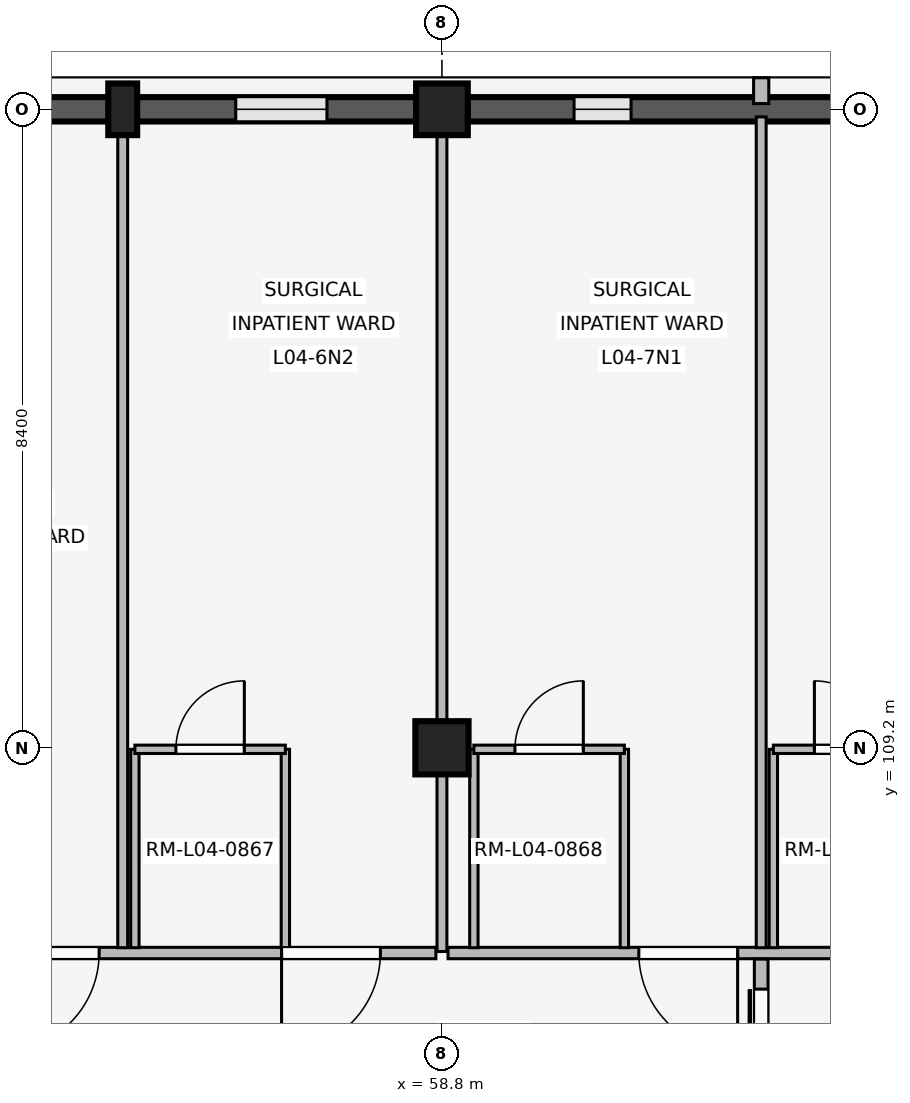
"""IFC4 building model, lengths in metres.
Left out: names, types, materials, properties, quantities, classifications, styles, units other than length and angle.
Written with IfcOpenShell. Run it as: python <this file> out.ifc"""

import sys

from ifc_helpers import new_model, si_unit, direction, frame, frame_2d, origin, origin_2d, place, context, subcontext, project, spatial, rectangle, extrude, element, fill, save


model = new_model("IFC4")
c1 = context("Model", 3, precision=1e-05, world=origin(), true_north=direction((0.0, 1.0)))
c2 = subcontext(c1, "Body", "Model", "MODEL_VIEW")
j1 = project(units=[si_unit("LENGTHUNIT", "METRE"), si_unit("PLANEANGLEUNIT", "RADIAN")], contexts=[c1])
p1 = place(None, origin())
s1 = spatial("IfcSite", under=j1, at=p1, CompositionType="ELEMENT")
p2 = place(p1, origin())
s2 = spatial("IfcBuilding", under=s1, at=p2, CompositionType="ELEMENT")
p3 = place(p2, frame((0.0, 0.0, 16.2)))
s3 = spatial("IfcBuildingStorey", under=s2, at=p3, CompositionType="ELEMENT", Elevation=16.2)
p4 = place(p3, frame((58.8, 109.2, 0.0), z_axis=(0.0, 0.0, 1.0), x_axis=(1.0, 0.0, 0.0)))
e1 = element("IfcColumn", 1, at=p4, inside=s3, PredefinedType="COLUMN", context=c2, shape_type="SweptSolid", body=[
    extrude(rectangle(XDim=0.7, YDim=0.7, at=origin_2d()), origin(), (0.0, 0.0, 1.0), 4.2),
])
p5 = place(p3, frame((58.8, 117.6, 0.0), z_axis=(0.0, 0.0, 1.0), x_axis=(1.0, 0.0, 0.0)))
e2 = element("IfcColumn", 2, at=p5, inside=s3, PredefinedType="COLUMN", context=c2, shape_type="SweptSolid", body=[
    extrude(rectangle(XDim=0.68, YDim=0.68, at=origin_2d()), origin(), (0.0, 0.0, 1.0), 4.2),
])
p6 = place(p3, frame((54.6, 117.6, 0.0), z_axis=(0.0, 0.0, 1.0), x_axis=(1.0, 0.0, 0.0)))
e3 = element("IfcColumn", 3, at=p6, inside=s3, PredefinedType="PILASTER", context=c2, shape_type="SweptSolid", body=[
    extrude(rectangle(XDim=0.38, YDim=0.68, at=origin_2d()), origin(), (0.0, 0.0, 1.0), 4.2),
])
p7 = place(p3, frame((50.735, 117.6, 0.0), z_axis=(0.0, 0.0, 1.0), x_axis=(1.0, 0.0, 0.0)))
e4 = element("IfcWall", 4, at=p7, inside=s3, PredefinedType="SOLIDWALL", context=c2, shape_type="SweptSolid", body=[
    extrude(rectangle(XDim=7.73, YDim=0.32, at=frame_2d((3.865, 0.0))), origin(), (0.0, 0.0, 1.0), 3.32),
])
p8 = place(p7, frame((1.178, 0.0, 0.85)))
e5 = element("IfcOpeningElement", 5, at=p8, cuts=e4, PredefinedType="OPENING", context=c2, shape_type="SweptSolid", body=[
    extrude(rectangle(XDim=1.2, YDim=1.55, at=frame_2d((0.6, 0.775))), frame((0.0, 0.17, 0.0), z_axis=(0.0, -1.0, 0.0), x_axis=(1.0, 0.0, 0.0)), (0.0, 0.0, 1.0), 0.34),
])
p9 = place(p7, frame((5.352, 0.0, 0.85)))
e6 = element("IfcOpeningElement", 6, at=p9, cuts=e4, PredefinedType="OPENING", context=c2, shape_type="SweptSolid", body=[
    extrude(rectangle(XDim=1.2, YDim=1.55, at=frame_2d((0.6, 0.775))), frame((0.0, 0.17, 0.0), z_axis=(0.0, -1.0, 0.0), x_axis=(1.0, 0.0, 0.0)), (0.0, 0.0, 1.0), 0.34),
])
p10 = place(p3, frame((59.135, 117.6, 0.0), z_axis=(0.0, 0.0, 1.0), x_axis=(1.0, 0.0, 0.0)))
e7 = element("IfcWall", 7, at=p10, inside=s3, PredefinedType="SOLIDWALL", context=c2, shape_type="SweptSolid", body=[
    extrude(rectangle(XDim=7.73, YDim=0.32, at=frame_2d((3.865, 0.0))), origin(), (0.0, 0.0, 1.0), 3.32),
])
p11 = place(p10, frame((1.403, 0.0, 0.85)))
e8 = element("IfcOpeningElement", 8, at=p11, cuts=e7, PredefinedType="OPENING", context=c2, shape_type="SweptSolid", body=[
    extrude(rectangle(XDim=0.75, YDim=1.85, at=frame_2d((0.375, 0.925))), frame((0.0, 0.17, 0.0), z_axis=(0.0, -1.0, 0.0), x_axis=(1.0, 0.0, 0.0)), (0.0, 0.0, 1.0), 0.34),
])
p12 = place(p10, frame((5.577, 0.0, 0.85)))
e9 = element("IfcOpeningElement", 9, at=p12, cuts=e7, PredefinedType="OPENING", context=c2, shape_type="SweptSolid", body=[
    extrude(rectangle(XDim=0.75, YDim=1.85, at=frame_2d((0.375, 0.925))), frame((0.0, 0.17, 0.0), z_axis=(0.0, -1.0, 0.0), x_axis=(1.0, 0.0, 0.0)), (0.0, 0.0, 1.0), 0.34),
])
p13 = place(p3, frame((63.0, 117.675, 0.0), z_axis=(0.0, 0.0, 1.0), x_axis=(0.0, 1.0, 0.0)))
e10 = element("IfcWall", 10, at=p13, inside=s3, PredefinedType="ELEMENTEDWALL", context=c2, shape_type="SweptSolid", body=[
    extrude(rectangle(XDim=0.34, YDim=0.2, at=frame_2d((0.17, 0.0))), origin(), (0.0, 0.0, 1.0), 3.3),
])
p14 = place(p3, frame((58.72, 106.5, 0.0), z_axis=(0.0, 0.0, 1.0), x_axis=(-1.0, 0.0, 0.0)))
e11 = element("IfcWall", 11, at=p14, inside=s3, PredefinedType="PARTITIONING", context=c2, shape_type="SweptSolid", body=[
    extrude(rectangle(XDim=7.96, YDim=0.15, at=frame_2d((3.98, 0.0))), origin(), (0.0, 0.0, 1.0), 3.3),
])
p15 = place(p14, frame((0.73, 0.0, 0.0)))
e12 = element("IfcOpeningElement", 12, at=p15, cuts=e11, PredefinedType="OPENING", context=c2, shape_type="SweptSolid", body=[
    extrude(rectangle(XDim=1.3, YDim=2.25, at=frame_2d((0.65, 1.125))), frame((0.0, 0.085, 0.0), z_axis=(0.0, -1.0, 0.0), x_axis=(1.0, 0.0, 0.0)), (0.0, 0.0, 1.0), 0.17),
])
p16 = place(p14, frame((4.43, 0.0, 0.0)))
e13 = element("IfcOpeningElement", 13, at=p16, cuts=e11, PredefinedType="OPENING", context=c2, shape_type="SweptSolid", body=[
    extrude(rectangle(XDim=1.3, YDim=2.25, at=frame_2d((0.65, 1.125))), frame((0.0, 0.085, 0.0), z_axis=(0.0, -1.0, 0.0), x_axis=(1.0, 0.0, 0.0)), (0.0, 0.0, 1.0), 0.17),
])
p17 = place(p3, frame((54.6, 106.57, 0.0), z_axis=(0.0, 0.0, 1.0), x_axis=(0.0, 1.0, 0.0)))
e14 = element("IfcWall", 14, at=p17, inside=s3, PredefinedType="PARTITIONING", context=c2, shape_type="SweptSolid", body=[
    extrude(rectangle(XDim=10.93, YDim=0.13, at=frame_2d((5.465, 0.0))), origin(), (0.0, 0.0, 1.0), 3.3),
])
for number, where, z_axis, x_axis in (
    (15, (54.76, 106.57, 0.0), (0.0, 0.0, 1.0), (0.0, 1.0, 0.0)),
    (16, (56.74, 106.57, 0.0), (0.0, 0.0, 1.0), (0.0, 1.0, 0.0)),
):
    element("IfcWall", number, at=place(p3, frame(where, z_axis=z_axis, x_axis=x_axis)), inside=s3, PredefinedType="PARTITIONING", context=c2, shape_type="SweptSolid", body=[
        extrude(rectangle(XDim=2.61, YDim=0.11, at=frame_2d((1.305, 0.0))), origin(), (0.0, 0.0, 1.0), 3.3),
    ])
p18 = place(p3, frame((54.76, 109.18, 0.0), z_axis=(0.0, 0.0, 1.0), x_axis=(1.0, 0.0, 0.0)))
e17 = element("IfcWall", 17, at=p18, inside=s3, PredefinedType="PARTITIONING", context=c2, shape_type="SweptSolid", body=[
    extrude(rectangle(XDim=1.98, YDim=0.11, at=frame_2d((0.99, 0.0))), origin(), (0.0, 0.0, 1.0), 3.3),
])
p19 = place(p18, frame((0.54, 0.0, 0.0)))
e18 = element("IfcOpeningElement", 18, at=p19, cuts=e17, PredefinedType="OPENING", context=c2, shape_type="SweptSolid", body=[
    extrude(rectangle(XDim=0.9, YDim=2.1, at=frame_2d((0.45, 1.05))), frame((0.0, 0.065, 0.0), z_axis=(0.0, -1.0, 0.0), x_axis=(1.0, 0.0, 0.0)), (0.0, 0.0, 1.0), 0.13),
])
p20 = place(p3, frame((58.8, 106.52, 0.0), z_axis=(0.0, 0.0, 1.0), x_axis=(0.0, 1.0, 0.0)))
e19 = element("IfcWall", 19, at=p20, inside=s3, PredefinedType="PARTITIONING", context=c2, shape_type="SweptSolid", body=[
    extrude(rectangle(XDim=10.94, YDim=0.13, at=frame_2d((5.47, 0.0))), origin(), (0.0, 0.0, 1.0), 3.3),
])
p21 = place(p3, frame((67.12, 106.5, 0.0), z_axis=(0.0, 0.0, 1.0), x_axis=(-1.0, 0.0, 0.0)))
e20 = element("IfcWall", 20, at=p21, inside=s3, PredefinedType="PARTITIONING", context=c2, shape_type="SweptSolid", body=[
    extrude(rectangle(XDim=8.24, YDim=0.15, at=frame_2d((4.12, 0.0))), origin(), (0.0, 0.0, 1.0), 3.3),
])
p22 = place(p21, frame((0.73, 0.0, 0.0)))
e21 = element("IfcOpeningElement", 21, at=p22, cuts=e20, PredefinedType="OPENING", context=c2, shape_type="SweptSolid", body=[
    extrude(rectangle(XDim=1.3, YDim=2.25, at=frame_2d((0.65, 1.125))), frame((0.0, 0.085, 0.0), z_axis=(0.0, -1.0, 0.0), x_axis=(1.0, 0.0, 0.0)), (0.0, 0.0, 1.0), 0.17),
])
p23 = place(p21, frame((4.43, 0.0, 0.0)))
e22 = element("IfcOpeningElement", 22, at=p23, cuts=e20, PredefinedType="OPENING", context=c2, shape_type="SweptSolid", body=[
    extrude(rectangle(XDim=1.3, YDim=2.25, at=frame_2d((0.65, 1.125))), frame((0.0, 0.085, 0.0), z_axis=(0.0, -1.0, 0.0), x_axis=(1.0, 0.0, 0.0)), (0.0, 0.0, 1.0), 0.17),
])
p24 = place(p3, frame((63.0, 106.57, 0.0), z_axis=(0.0, 0.0, 1.0), x_axis=(0.0, 1.0, 0.0)))
e23 = element("IfcWall", 23, at=p24, inside=s3, PredefinedType="PARTITIONING", context=c2, shape_type="SweptSolid", body=[
    extrude(rectangle(XDim=10.93, YDim=0.13, at=frame_2d((5.465, 0.0))), origin(), (0.0, 0.0, 1.0), 3.3),
])
for number, where, z_axis, x_axis in (
    (24, (59.22, 106.57, 0.0), (0.0, 0.0, 1.0), (0.0, 1.0, 0.0)),
    (25, (61.2, 106.57, 0.0), (0.0, 0.0, 1.0), (0.0, 1.0, 0.0)),
):
    element("IfcWall", number, at=place(p3, frame(where, z_axis=z_axis, x_axis=x_axis)), inside=s3, PredefinedType="PARTITIONING", context=c2, shape_type="SweptSolid", body=[
        extrude(rectangle(XDim=2.61, YDim=0.11, at=frame_2d((1.305, 0.0))), origin(), (0.0, 0.0, 1.0), 3.3),
    ])
p25 = place(p3, frame((59.22, 109.18, 0.0), z_axis=(0.0, 0.0, 1.0), x_axis=(1.0, 0.0, 0.0)))
e26 = element("IfcWall", 26, at=p25, inside=s3, PredefinedType="PARTITIONING", context=c2, shape_type="SweptSolid", body=[
    extrude(rectangle(XDim=1.98, YDim=0.11, at=frame_2d((0.99, 0.0))), origin(), (0.0, 0.0, 1.0), 3.3),
])
p26 = place(p25, frame((0.54, 0.0, 0.0)))
e27 = element("IfcOpeningElement", 27, at=p26, cuts=e26, PredefinedType="OPENING", context=c2, shape_type="SweptSolid", body=[
    extrude(rectangle(XDim=0.9, YDim=2.1, at=frame_2d((0.45, 1.05))), frame((0.0, 0.065, 0.0), z_axis=(0.0, -1.0, 0.0), x_axis=(1.0, 0.0, 0.0)), (0.0, 0.0, 1.0), 0.13),
])
p27 = place(p3, frame((63.16, 106.57, 0.0), z_axis=(0.0, 0.0, 1.0), x_axis=(0.0, 1.0, 0.0)))
e28 = element("IfcWall", 28, at=p27, inside=s3, PredefinedType="PARTITIONING", context=c2, shape_type="SweptSolid", body=[
    extrude(rectangle(XDim=2.61, YDim=0.11, at=frame_2d((1.305, 0.0))), origin(), (0.0, 0.0, 1.0), 3.3),
])
p28 = place(p3, frame((63.16, 109.18, 0.0), z_axis=(0.0, 0.0, 1.0), x_axis=(1.0, 0.0, 0.0)))
e29 = element("IfcWall", 29, at=p28, inside=s3, PredefinedType="PARTITIONING", context=c2, shape_type="SweptSolid", body=[
    extrude(rectangle(XDim=1.98, YDim=0.11, at=frame_2d((0.99, 0.0))), origin(), (0.0, 0.0, 1.0), 3.3),
])
p29 = place(p28, frame((0.54, 0.0, 0.0)))
e30 = element("IfcOpeningElement", 30, at=p29, cuts=e29, PredefinedType="OPENING", context=c2, shape_type="SweptSolid", body=[
    extrude(rectangle(XDim=0.9, YDim=2.1, at=frame_2d((0.45, 1.05))), frame((0.0, 0.065, 0.0), z_axis=(0.0, -1.0, 0.0), x_axis=(1.0, 0.0, 0.0)), (0.0, 0.0, 1.0), 0.13),
])
p30 = place(p3, frame((63.0, 103.58, 0.0), z_axis=(0.0, 0.0, 1.0), x_axis=(0.0, 1.0, 0.0)))
e31 = element("IfcWall", 31, at=p30, inside=s3, PredefinedType="PARTITIONING", context=c2, shape_type="SweptSolid", body=[
    extrude(rectangle(XDim=2.84, YDim=0.18, at=frame_2d((1.42, 0.0))), origin(), (0.0, 0.0, 1.0), 3.3),
])
p31 = place(p30, frame((0.395, 0.0, 0.0)))
e32 = element("IfcOpeningElement", 32, at=p31, cuts=e31, PredefinedType="OPENING", context=c2, shape_type="SweptSolid", body=[
    extrude(rectangle(XDim=2.05, YDim=2.35, at=frame_2d((1.025, 1.175))), frame((0.0, 0.1, 0.0), z_axis=(0.0, -1.0, 0.0), x_axis=(1.0, 0.0, 0.0)), (0.0, 0.0, 1.0), 0.2),
])
p32 = place(p9, origin())
e33 = element("IfcWindow", 33, at=p32, inside=s3, PartitioningType="SINGLE_PANEL", PredefinedType="WINDOW", context=c2, shape_type="SweptSolid", body=[
    extrude(rectangle(XDim=1.2, YDim=1.55, at=frame_2d((0.6, 0.775))), frame((0.0, 0.03, 0.0), z_axis=(0.0, -1.0, 0.0), x_axis=(1.0, 0.0, 0.0)), (0.0, 0.0, 1.0), 0.06),
])
fill(e6, e33)
p33 = place(p11, origin())
e34 = element("IfcWindow", 34, at=p33, inside=s3, PartitioningType="SINGLE_PANEL", PredefinedType="WINDOW", context=c2, shape_type="SweptSolid", body=[
    extrude(rectangle(XDim=0.75, YDim=1.85, at=frame_2d((0.375, 0.925))), frame((0.0, 0.03, 0.0), z_axis=(0.0, -1.0, 0.0), x_axis=(1.0, 0.0, 0.0)), (0.0, 0.0, 1.0), 0.06),
])
fill(e8, e34)
p34 = place(p15, origin())
e35 = element("IfcDoor", 35, at=p34, inside=s3, OperationType="SINGLE_SWING_RIGHT", PredefinedType="DOOR", context=c2, shape_type="SweptSolid", body=[
    extrude(rectangle(XDim=1.3, YDim=2.25, at=frame_2d((0.65, 1.125))), frame((0.0, 0.025, 0.0), z_axis=(0.0, -1.0, 0.0), x_axis=(1.0, 0.0, 0.0)), (0.0, 0.0, 1.0), 0.05),
])
fill(e12, e35)
p35 = place(p16, origin())
e36 = element("IfcDoor", 36, at=p35, inside=s3, OperationType="SINGLE_SWING_RIGHT", PredefinedType="DOOR", context=c2, shape_type="SweptSolid", body=[
    extrude(rectangle(XDim=1.3, YDim=2.25, at=frame_2d((0.65, 1.125))), frame((0.0, 0.025, 0.0), z_axis=(0.0, -1.0, 0.0), x_axis=(1.0, 0.0, 0.0)), (0.0, 0.0, 1.0), 0.05),
])
fill(e13, e36)
p36 = place(p19, origin())
e37 = element("IfcDoor", 37, at=p36, inside=s3, OperationType="SINGLE_SWING_RIGHT", PredefinedType="DOOR", context=c2, shape_type="SweptSolid", body=[
    extrude(rectangle(XDim=0.9, YDim=2.1, at=frame_2d((0.45, 1.05))), frame((0.0, 0.025, 0.0), z_axis=(0.0, -1.0, 0.0), x_axis=(1.0, 0.0, 0.0)), (0.0, 0.0, 1.0), 0.05),
])
fill(e18, e37)
p37 = place(p23, origin())
e38 = element("IfcDoor", 38, at=p37, inside=s3, OperationType="SINGLE_SWING_LEFT", PredefinedType="DOOR", context=c2, shape_type="SweptSolid", body=[
    extrude(rectangle(XDim=1.3, YDim=2.25, at=frame_2d((0.65, 1.125))), frame((0.0, 0.025, 0.0), z_axis=(0.0, -1.0, 0.0), x_axis=(1.0, 0.0, 0.0)), (0.0, 0.0, 1.0), 0.05),
])
fill(e22, e38)
p38 = place(p26, origin())
e39 = element("IfcDoor", 39, at=p38, inside=s3, OperationType="SINGLE_SWING_RIGHT", PredefinedType="DOOR", context=c2, shape_type="SweptSolid", body=[
    extrude(rectangle(XDim=0.9, YDim=2.1, at=frame_2d((0.45, 1.05))), frame((0.0, 0.025, 0.0), z_axis=(0.0, -1.0, 0.0), x_axis=(1.0, 0.0, 0.0)), (0.0, 0.0, 1.0), 0.05),
])
fill(e27, e39)
p39 = place(p29, origin())
e40 = element("IfcDoor", 40, at=p39, inside=s3, OperationType="SINGLE_SWING_LEFT", PredefinedType="DOOR", context=c2, shape_type="SweptSolid", body=[
    extrude(rectangle(XDim=0.9, YDim=2.1, at=frame_2d((0.45, 1.05))), frame((0.0, 0.025, 0.0), z_axis=(0.0, -1.0, 0.0), x_axis=(1.0, 0.0, 0.0)), (0.0, 0.0, 1.0), 0.05),
])
fill(e30, e40)
p40 = place(p31, origin())
e41 = element("IfcDoor", 41, at=p40, inside=s3, OperationType="SLIDING_TO_LEFT", PredefinedType="DOOR", context=c2, shape_type="SweptSolid", body=[
    extrude(rectangle(XDim=2.05, YDim=2.35, at=frame_2d((1.025, 1.175))), frame((0.0, 0.025, 0.0), z_axis=(0.0, -1.0, 0.0), x_axis=(1.0, 0.0, 0.0)), (0.0, 0.0, 1.0), 0.05),
])
fill(e32, e41)
save(model, sys.argv[1])
